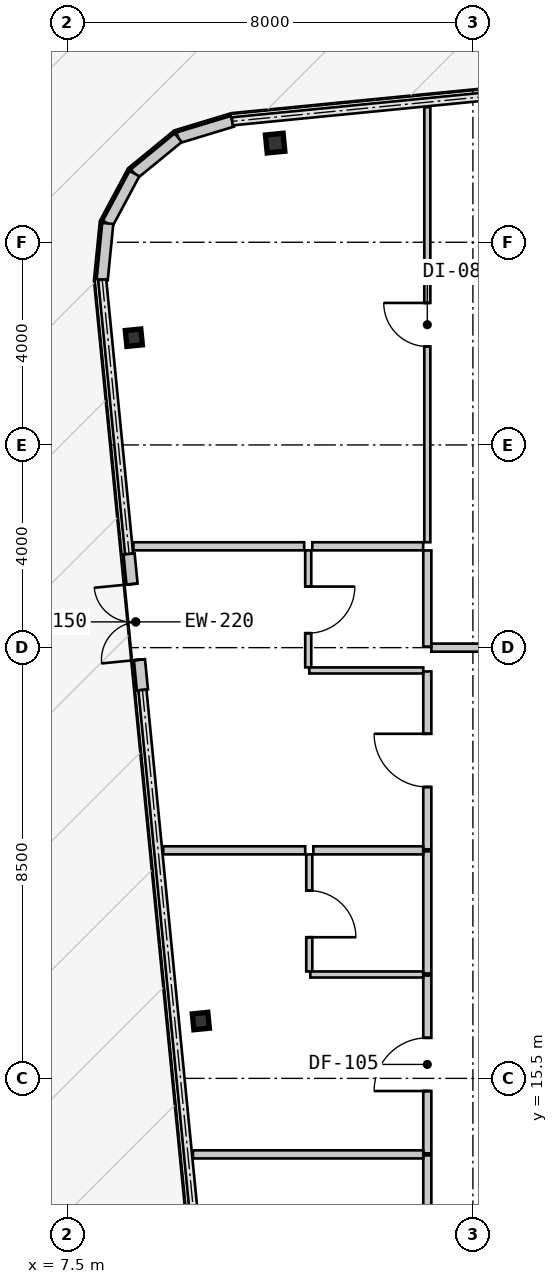
"""IFC4 building model, lengths in metres.
Left out: names, types, materials, properties, quantities, classifications, styles, units other than length and angle.
Written with IfcOpenShell. Run it as: python <this file> out.ifc"""

import sys

from ifc_helpers import new_model, si_unit, direction, frame, frame_2d, origin, origin_2d, place, context, subcontext, project, spatial, rectangle, i_section, extrude, source, transform, mapped, element, fill, save


model = new_model("IFC4")
c1 = context("Model", 3, precision=1e-05, world=origin(), true_north=direction((0.0, 1.0)))
c2 = subcontext(c1, "Body", "Model", "MODEL_VIEW")
j1 = project(units=[si_unit("LENGTHUNIT", "METRE"), si_unit("PLANEANGLEUNIT", "RADIAN")], contexts=[c1])
p1 = place(None, origin())
s1 = spatial("IfcSite", under=j1, at=p1, CompositionType="ELEMENT")
p2 = place(p1, origin())
s2 = spatial("IfcBuilding", under=s1, at=p2, CompositionType="ELEMENT")
p3 = place(p2, frame((0.0, 0.0, 65.1)))
s3 = spatial("IfcBuildingStorey", under=s2, at=p3, CompositionType="ELEMENT", Elevation=65.1)
m1 = source(origin(), c2, "Body", "SweptSolid", [
    extrude(i_section(OverallWidth=0.35, OverallDepth=0.356, WebThickness=0.018, FlangeThickness=0.028, at=origin_2d()), origin(), (0.0, 0.0, 1.0), 3.15),
])
p4 = place(p3, frame((11.597, 33.957, 0.0), z_axis=(0.0, 0.0, 1.0), x_axis=(0.995227399982, 0.097582899759, 0.0)))
e1 = element("IfcColumn", 1, at=p4, inside=s3, PredefinedType="COLUMN", context=c2, shape_type="MappedRepresentation", body=[
    mapped(m1, transform((0.0, 0.0, 0.0), scale=1.0)),
])
m2 = source(origin(), c2, "Body", "SweptSolid", [
    extrude(i_section(OverallWidth=0.307, OverallDepth=0.315, WebThickness=0.012, FlangeThickness=0.019, at=origin_2d()), origin(), (0.0, 0.0, 1.0), 3.15),
])
for number, where, z_axis, x_axis in (
    (2, (10.131, 16.631, 0.0), (0.0, 0.0, 1.0), (0.995, 0.098, 0.0)),
    (3, (8.808, 30.116, 0.0), (0.0, 0.0, 1.0), (0.995, 0.098, 0.0)),
):
    element("IfcColumn", number, at=place(p3, frame(where, z_axis=z_axis, x_axis=x_axis)), inside=s3, PredefinedType="COLUMN", context=c2, shape_type="MappedRepresentation", body=[
        mapped(m2, transform((0.0, 0.0, 0.0), scale=1.0)),
    ])
m3 = source(origin(), c2, "Body", "SweptSolid", [
    extrude(rectangle(XDim=1.116, YDim=0.22, at=frame_2d((0.558, 0.0))), origin(), (0.0, 0.0, 1.0), 2.93),
])
p5 = place(p3, frame((10.751, 34.386, 0.0), z_axis=(0.0, 0.0, 1.0), x_axis=(-0.957070388811, -0.289855603468, 0.0)))
e4 = element("IfcWall", 4, at=p5, inside=s3, PredefinedType="SOLIDWALL", context=c2, shape_type="MappedRepresentation", body=[
    mapped(m3, transform((0.0, 0.0, 0.0), scale=1.0)),
])
m4 = source(origin(), c2, "Body", "SweptSolid", [
    extrude(rectangle(XDim=1.116, YDim=0.22, at=frame_2d((0.558, 0.0))), origin(), (0.0, 0.0, 1.0), 2.93),
])
p6 = place(p3, frame((9.683, 34.063, 0.0), z_axis=(0.0, 0.0, 1.0), x_axis=(-0.773254916409, -0.634095287989, 0.0)))
e5 = element("IfcWall", 5, at=p6, inside=s3, PredefinedType="SOLIDWALL", context=c2, shape_type="MappedRepresentation", body=[
    mapped(m4, transform((0.0, 0.0, 0.0), scale=1.0)),
])
m5 = source(origin(), c2, "Body", "SweptSolid", [
    extrude(rectangle(XDim=1.116, YDim=0.22, at=frame_2d((0.558, 0.0))), origin(), (0.0, 0.0, 1.0), 2.93),
])
p7 = place(p3, frame((8.82, 33.355, 0.0), z_axis=(0.0, 0.0, 1.0), x_axis=(-0.471802540493, -0.881704237704, 0.0)))
e6 = element("IfcWall", 6, at=p7, inside=s3, PredefinedType="SOLIDWALL", context=c2, shape_type="MappedRepresentation", body=[
    mapped(m5, transform((0.0, 0.0, 0.0), scale=1.0)),
])
p8 = place(p3, frame((8.293, 32.371, 0.0), z_axis=(0.0, 0.0, 1.0), x_axis=(-0.098463783145, -0.99514063499, 0.0)))
e7 = element("IfcWall", 7, at=p8, inside=s3, PredefinedType="SOLIDWALL", context=c2, shape_type="MappedRepresentation", body=[
    mapped(m4, transform((0.0, 0.0, 0.0), scale=1.0)),
])
m6 = source(origin(), c2, "Body", "SweptSolid", [
    extrude(rectangle(XDim=2.7, YDim=0.22, at=frame_2d((1.35, 0.0))), origin(), (0.0, 0.0, 1.0), 2.93),
])
p9 = place(p3, frame((8.714, 25.852, 0.0), z_axis=(0.0, 0.0, 1.0), x_axis=(0.097659231838, -0.995219912601, 0.0)))
e8 = element("IfcWall", 8, at=p9, inside=s3, PredefinedType="SOLIDWALL", context=c2, shape_type="MappedRepresentation", body=[
    mapped(m6, transform((0.0, 0.0, 0.0), scale=1.0)),
])
m7 = source(origin(), c2, "Body", "SweptSolid", [
    extrude(rectangle(XDim=1.5, YDim=2.2, at=frame_2d((0.75, 1.1))), frame((0.0, 0.12, 0.0), z_axis=(0.0, -1.0, 0.0), x_axis=(1.0, 0.0, 0.0)), (0.0, 0.0, 1.0), 0.24),
])
p10 = place(p9, frame((0.6, 0.0, 0.0)))
e9 = element("IfcOpeningElement", 9, at=p10, cuts=e8, PredefinedType="OPENING", context=c2, shape_type="MappedRepresentation", body=[
    mapped(m7, transform((0.0, 0.0, 0.0), scale=1.0)),
])
m8 = source(origin(), c2, "Body", "SweptSolid", [
    extrude(rectangle(XDim=3.201, YDim=0.16, at=frame_2d((1.601, 0.0))), origin(), (0.0, 0.0, 1.0), 2.93),
])
p11 = place(p3, frame((14.6, 10.778, 0.0), z_axis=(0.0, 0.0, 1.0), x_axis=(0.0, 1.0, 0.0)))
e10 = element("IfcWall", 10, at=p11, inside=s3, PredefinedType="PARTITIONING", context=c2, shape_type="MappedRepresentation", body=[
    mapped(m8, transform((0.0, 0.0, 0.0), scale=1.0)),
])
m9 = source(origin(), c2, "Body", "SweptSolid", [
    extrude(rectangle(XDim=0.92, YDim=2.1, at=frame_2d((0.46, 1.05))), frame((0.0, 0.09, 0.0), z_axis=(0.0, -1.0, 0.0), x_axis=(1.0, 0.0, 0.0)), (0.0, 0.0, 1.0), 0.18),
])
p12 = place(p11, frame((0.392, 0.0, 0.0)))
e11 = element("IfcOpeningElement", 11, at=p12, cuts=e10, PredefinedType="OPENING", context=c2, shape_type="MappedRepresentation", body=[
    mapped(m9, transform((0.0, 0.0, 0.0), scale=1.0)),
])
m10 = source(origin(), c2, "Body", "SweptSolid", [
    extrude(rectangle(XDim=3.51, YDim=0.16, at=frame_2d((1.755, 0.0))), origin(), (0.0, 0.0, 1.0), 2.93),
])
p13 = place(p3, frame((14.6, 14.02, 0.0), z_axis=(0.0, 0.0, 1.0), x_axis=(0.0, 1.0, 0.0)))
e12 = element("IfcWall", 12, at=p13, inside=s3, PredefinedType="PARTITIONING", context=c2, shape_type="MappedRepresentation", body=[
    mapped(m10, transform((0.0, 0.0, 0.0), scale=1.0)),
])
m11 = source(origin(), c2, "Body", "SweptSolid", [
    extrude(rectangle(XDim=1.05, YDim=2.1, at=frame_2d((0.525, 1.05))), frame((0.0, 0.09, 0.0), z_axis=(0.0, -1.0, 0.0), x_axis=(1.0, 0.0, 0.0)), (0.0, 0.0, 1.0), 0.18),
])
p14 = place(p13, frame((1.23, 0.0, 0.0)))
e13 = element("IfcOpeningElement", 13, at=p14, cuts=e12, PredefinedType="OPENING", context=c2, shape_type="MappedRepresentation", body=[
    mapped(m11, transform((0.0, 0.0, 0.0), scale=1.0)),
])
m12 = source(origin(), c2, "Body", "SweptSolid", [
    extrude(rectangle(XDim=2.409, YDim=0.16, at=frame_2d((1.205, 0.0))), origin(), (0.0, 0.0, 1.0), 2.93),
])
p15 = place(p3, frame((14.6, 17.57, 0.0), z_axis=(0.0, 0.0, 1.0), x_axis=(0.0, 1.0, 0.0)))
e14 = element("IfcWall", 14, at=p15, inside=s3, PredefinedType="PARTITIONING", context=c2, shape_type="MappedRepresentation", body=[
    mapped(m12, transform((0.0, 0.0, 0.0), scale=1.0)),
])
p16 = place(p3, frame((14.6, 20.02, 0.0), z_axis=(0.0, 0.0, 1.0), x_axis=(0.0, 1.0, 0.0)))
e15 = element("IfcWall", 15, at=p16, inside=s3, PredefinedType="PARTITIONING", context=c2, shape_type="MappedRepresentation", body=[
    mapped(m10, transform((0.0, 0.0, 0.0), scale=1.0)),
])
p17 = place(p16, frame((1.23, 0.0, 0.0)))
e16 = element("IfcOpeningElement", 16, at=p17, cuts=e15, PredefinedType="OPENING", context=c2, shape_type="MappedRepresentation", body=[
    mapped(m11, transform((0.0, 0.0, 0.0), scale=1.0)),
])
m13 = source(origin(), c2, "Body", "SweptSolid", [
    extrude(rectangle(XDim=4.17, YDim=0.16, at=frame_2d((2.085, 0.0))), origin(), (0.0, 0.0, 1.0), 2.93),
])
p18 = place(p3, frame((14.68, 24.0, 0.0), z_axis=(0.0, 0.0, 1.0), x_axis=(1.0, 0.0, 0.0)))
e17 = element("IfcWall", 17, at=p18, inside=s3, PredefinedType="PARTITIONING", context=c2, shape_type="MappedRepresentation", body=[
    mapped(m13, transform((0.0, 0.0, 0.0), scale=1.0)),
])
p19 = place(p18, frame((1.69, 0.0, 0.0)))
e18 = element("IfcOpeningElement", 18, at=p19, cuts=e17, PredefinedType="OPENING", context=c2, shape_type="MappedRepresentation", body=[
    mapped(m9, transform((0.0, 0.0, 0.0), scale=1.0)),
])
m14 = source(origin(), c2, "Body", "SweptSolid", [
    extrude(rectangle(XDim=4.546, YDim=0.16, at=frame_2d((2.273, 0.0))), origin(), (0.0, 0.0, 1.0), 2.93),
])
p20 = place(p3, frame((9.974, 14.0, 0.0), z_axis=(0.0, 0.0, 1.0), x_axis=(1.0, 0.0, 0.0)))
e19 = element("IfcWall", 19, at=p20, inside=s3, PredefinedType="PARTITIONING", context=c2, shape_type="MappedRepresentation", body=[
    mapped(m14, transform((0.0, 0.0, 0.0), scale=1.0)),
])
m15 = source(origin(), c2, "Body", "SweptSolid", [
    extrude(rectangle(XDim=2.31, YDim=0.12, at=frame_2d((1.155, 0.0))), origin(), (0.0, 0.0, 1.0), 2.93),
])
p21 = place(p3, frame((12.271, 19.92, 0.0), z_axis=(0.0, 0.0, 1.0), x_axis=(0.0, -1.0, 0.0)))
e20 = element("IfcWall", 20, at=p21, inside=s3, PredefinedType="PARTITIONING", context=c2, shape_type="MappedRepresentation", body=[
    mapped(m15, transform((0.0, 0.0, 0.0), scale=1.0)),
])
m16 = source(origin(), c2, "Body", "SweptSolid", [
    extrude(rectangle(XDim=0.92, YDim=2.1, at=frame_2d((0.46, 1.05))), frame((0.0, 0.07, 0.0), z_axis=(0.0, -1.0, 0.0), x_axis=(1.0, 0.0, 0.0)), (0.0, 0.0, 1.0), 0.14),
])
p22 = place(p21, frame((0.715, 0.0, 0.0)))
e21 = element("IfcOpeningElement", 21, at=p22, cuts=e20, PredefinedType="OPENING", context=c2, shape_type="MappedRepresentation", body=[
    mapped(m16, transform((0.0, 0.0, 0.0), scale=1.0)),
])
m17 = source(origin(), c2, "Body", "SweptSolid", [
    extrude(rectangle(XDim=2.229, YDim=0.12, at=frame_2d((1.115, 0.0))), origin(), (0.0, 0.0, 1.0), 2.93),
])
p23 = place(p3, frame((12.291, 17.55, 0.0), z_axis=(0.0, 0.0, 1.0), x_axis=(1.0, 0.0, 0.0)))
e22 = element("IfcWall", 22, at=p23, inside=s3, PredefinedType="PARTITIONING", context=c2, shape_type="MappedRepresentation", body=[
    mapped(m17, transform((0.0, 0.0, 0.0), scale=1.0)),
])
m18 = source(origin(), c2, "Body", "SweptSolid", [
    extrude(rectangle(XDim=2.803, YDim=0.16, at=frame_2d((1.401, 0.0))), origin(), (0.0, 0.0, 1.0), 2.93),
])
p24 = place(p3, frame((9.388, 20.0, 0.0), z_axis=(0.0, 0.0, 1.0), x_axis=(1.0, 0.0, 0.0)))
e23 = element("IfcWall", 23, at=p24, inside=s3, PredefinedType="PARTITIONING", context=c2, shape_type="MappedRepresentation", body=[
    mapped(m18, transform((0.0, 0.0, 0.0), scale=1.0)),
])
m19 = source(origin(), c2, "Body", "SweptSolid", [
    extrude(rectangle(XDim=2.167, YDim=0.16, at=frame_2d((1.084, 0.0))), origin(), (0.0, 0.0, 1.0), 2.93),
])
p25 = place(p3, frame((12.351, 20.0, 0.0), z_axis=(0.0, 0.0, 1.0), x_axis=(1.0, 0.0, 0.0)))
e24 = element("IfcWall", 24, at=p25, inside=s3, PredefinedType="PARTITIONING", context=c2, shape_type="MappedRepresentation", body=[
    mapped(m19, transform((0.0, 0.0, 0.0), scale=1.0)),
])
p26 = place(p3, frame((12.25, 25.92, 0.0), z_axis=(0.0, 0.0, 1.0), x_axis=(0.0, -1.0, 0.0)))
e25 = element("IfcWall", 25, at=p26, inside=s3, PredefinedType="PARTITIONING", context=c2, shape_type="MappedRepresentation", body=[
    mapped(m15, transform((0.0, 0.0, 0.0), scale=1.0)),
])
p27 = place(p26, frame((0.715, 0.0, 0.0)))
e26 = element("IfcOpeningElement", 26, at=p27, cuts=e25, PredefinedType="OPENING", context=c2, shape_type="MappedRepresentation", body=[
    mapped(m16, transform((0.0, 0.0, 0.0), scale=1.0)),
])
m20 = source(origin(), c2, "Body", "SweptSolid", [
    extrude(rectangle(XDim=2.25, YDim=0.12, at=frame_2d((1.125, 0.0))), origin(), (0.0, 0.0, 1.0), 2.93),
])
p28 = place(p3, frame((12.27, 23.55, 0.0), z_axis=(0.0, 0.0, 1.0), x_axis=(1.0, 0.0, 0.0)))
e27 = element("IfcWall", 27, at=p28, inside=s3, PredefinedType="PARTITIONING", context=c2, shape_type="MappedRepresentation", body=[
    mapped(m20, transform((0.0, 0.0, 0.0), scale=1.0)),
])
m21 = source(origin(), c2, "Body", "SweptSolid", [
    extrude(rectangle(XDim=3.37, YDim=0.16, at=frame_2d((1.685, 0.0))), origin(), (0.0, 0.0, 1.0), 2.93),
])
p29 = place(p3, frame((8.8, 26.0, 0.0), z_axis=(0.0, 0.0, 1.0), x_axis=(1.0, 0.0, 0.0)))
e28 = element("IfcWall", 28, at=p29, inside=s3, PredefinedType="PARTITIONING", context=c2, shape_type="MappedRepresentation", body=[
    mapped(m21, transform((0.0, 0.0, 0.0), scale=1.0)),
])
m22 = source(origin(), c2, "Body", "SweptSolid", [
    extrude(rectangle(XDim=2.188, YDim=0.16, at=frame_2d((1.094, 0.0))), origin(), (0.0, 0.0, 1.0), 2.93),
])
p30 = place(p3, frame((12.33, 26.0, 0.0), z_axis=(0.0, 0.0, 1.0), x_axis=(1.0, 0.0, 0.0)))
e29 = element("IfcWall", 29, at=p30, inside=s3, PredefinedType="PARTITIONING", context=c2, shape_type="MappedRepresentation", body=[
    mapped(m22, transform((0.0, 0.0, 0.0), scale=1.0)),
])
m23 = source(origin(), c2, "Body", "SweptSolid", [
    extrude(rectangle(XDim=1.898, YDim=0.16, at=frame_2d((0.949, 0.0))), origin(), (0.0, 0.0, 1.0), 2.93),
])
p31 = place(p3, frame((14.6, 25.918, 0.0), z_axis=(0.0, 0.0, 1.0), x_axis=(0.0, -1.0, 0.0)))
e30 = element("IfcWall", 30, at=p31, inside=s3, PredefinedType="PARTITIONING", context=c2, shape_type="MappedRepresentation", body=[
    mapped(m23, transform((0.0, 0.0, 0.0), scale=1.0)),
])
m24 = source(origin(), c2, "Body", "SweptSolid", [
    extrude(rectangle(XDim=8.585, YDim=0.12, at=frame_2d((4.293, 0.0))), origin(), (0.0, 0.0, 1.0), 2.93),
])
p32 = place(p3, frame((14.6, 34.666, 0.0), z_axis=(0.0, 0.0, 1.0), x_axis=(0.0, -1.0, 0.0)))
e31 = element("IfcWall", 31, at=p32, inside=s3, PredefinedType="PARTITIONING", context=c2, shape_type="MappedRepresentation", body=[
    mapped(m24, transform((0.0, 0.0, 0.0), scale=1.0)),
])
m25 = source(origin(), c2, "Body", "SweptSolid", [
    extrude(rectangle(XDim=0.86, YDim=2.1, at=frame_2d((0.43, 1.05))), frame((0.0, 0.07, 0.0), z_axis=(0.0, -1.0, 0.0), x_axis=(1.0, 0.0, 0.0)), (0.0, 0.0, 1.0), 0.14),
])
p33 = place(p32, frame((3.863, 0.0, 0.0)))
e32 = element("IfcOpeningElement", 32, at=p33, cuts=e31, PredefinedType="OPENING", context=c2, shape_type="MappedRepresentation", body=[
    mapped(m25, transform((0.0, 0.0, 0.0), scale=1.0)),
])
m26 = source(origin(), c2, "Body", "SweptSolid", [
    extrude(rectangle(XDim=1.5, YDim=2.2, at=frame_2d((0.75, 1.1))), frame((0.0, 0.025, 0.0), z_axis=(0.0, -1.0, 0.0), x_axis=(1.0, 0.0, 0.0)), (0.0, 0.0, 1.0), 0.05),
])
p34 = place(p10, frame((1.5, 0.0, 0.0), z_axis=(0.0, 0.0, 1.0), x_axis=(-1.0, 0.0, 0.0)))
e33 = element("IfcDoor", 33, at=p34, inside=s3, OperationType="DOUBLE_DOOR_SINGLE_SWING", PredefinedType="DOOR", context=c2, shape_type="MappedRepresentation", body=[
    mapped(m26, transform((0.0, 0.0, 0.0), scale=1.0)),
])
fill(e9, e33)
m27 = source(origin(), c2, "Body", "SweptSolid", [
    extrude(rectangle(XDim=1.05, YDim=2.1, at=frame_2d((0.525, 1.05))), frame((0.0, 0.025, 0.0), z_axis=(0.0, -1.0, 0.0), x_axis=(1.0, 0.0, 0.0)), (0.0, 0.0, 1.0), 0.05),
])
p35 = place(p14, origin())
e34 = element("IfcDoor", 34, at=p35, inside=s3, OperationType="SINGLE_SWING_LEFT", PredefinedType="DOOR", context=c2, shape_type="MappedRepresentation", body=[
    mapped(m27, transform((0.0, 0.0, 0.0), scale=1.0)),
])
fill(e13, e34)
p36 = place(p17, origin())
e35 = element("IfcDoor", 35, at=p36, inside=s3, OperationType="SINGLE_SWING_RIGHT", PredefinedType="DOOR", context=c2, shape_type="MappedRepresentation", body=[
    mapped(m27, transform((0.0, 0.0, 0.0), scale=1.0)),
])
fill(e16, e35)
m28 = source(origin(), c2, "Body", "SweptSolid", [
    extrude(rectangle(XDim=0.92, YDim=2.1, at=frame_2d((0.46, 1.05))), frame((0.0, 0.025, 0.0), z_axis=(0.0, -1.0, 0.0), x_axis=(1.0, 0.0, 0.0)), (0.0, 0.0, 1.0), 0.05),
])
p37 = place(p22, origin())
e36 = element("IfcDoor", 36, at=p37, inside=s3, OperationType="SINGLE_SWING_RIGHT", PredefinedType="DOOR", context=c2, shape_type="MappedRepresentation", body=[
    mapped(m28, transform((0.0, 0.0, 0.0), scale=1.0)),
])
fill(e21, e36)
p38 = place(p27, origin())
e37 = element("IfcDoor", 37, at=p38, inside=s3, OperationType="SINGLE_SWING_LEFT", PredefinedType="DOOR", context=c2, shape_type="MappedRepresentation", body=[
    mapped(m28, transform((0.0, 0.0, 0.0), scale=1.0)),
])
fill(e26, e37)
m29 = source(origin(), c2, "Body", "SweptSolid", [
    extrude(rectangle(XDim=0.86, YDim=2.1, at=frame_2d((0.43, 1.05))), frame((0.0, 0.025, 0.0), z_axis=(0.0, -1.0, 0.0), x_axis=(1.0, 0.0, 0.0)), (0.0, 0.0, 1.0), 0.05),
])
p39 = place(p33, frame((0.86, 0.0, 0.0), z_axis=(0.0, 0.0, 1.0), x_axis=(-1.0, 0.0, 0.0)))
e38 = element("IfcDoor", 38, at=p39, inside=s3, OperationType="SINGLE_SWING_RIGHT", PredefinedType="DOOR", context=c2, shape_type="MappedRepresentation", body=[
    mapped(m29, transform((0.0, 0.0, 0.0), scale=1.0)),
])
fill(e32, e38)
save(model, sys.argv[1])
